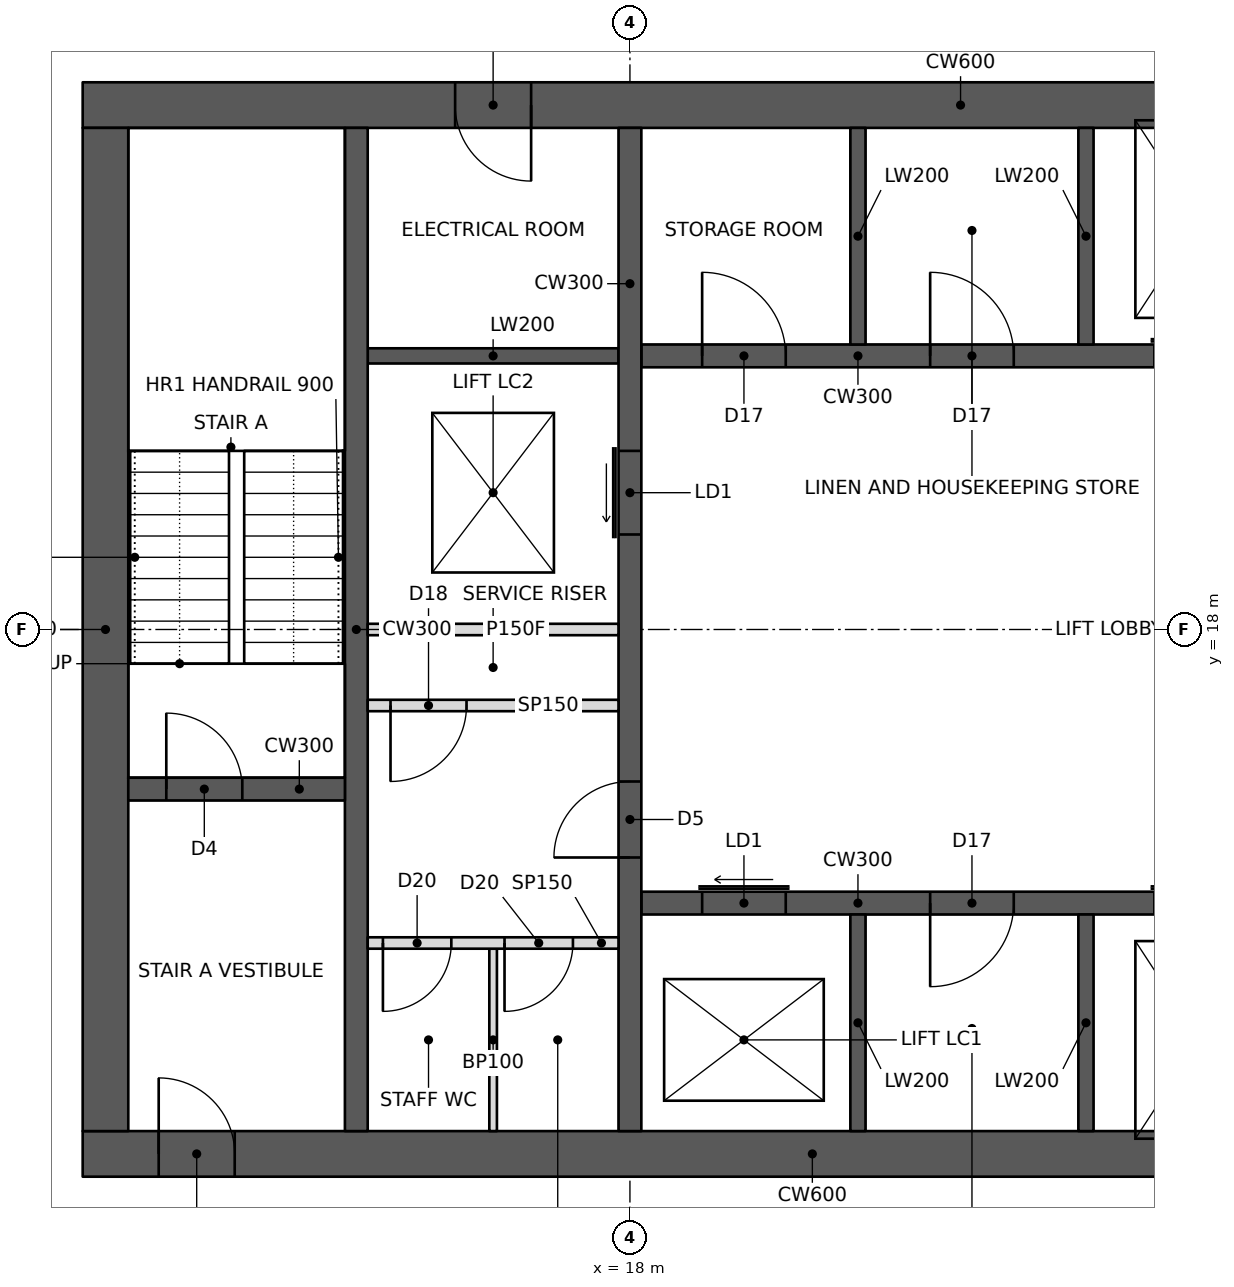
"""IFC4 building model, lengths in metres.
Left out: names, types, materials, properties, quantities, classifications, styles, units other than length and angle.
Written with IfcOpenShell. Run it as: python <this file> out.ifc"""

import sys

from ifc_helpers import new_model, si_unit, direction, frame, frame_2d, origin, place, context, subcontext, project, spatial, rectangle, extrude, element, fill, save


model = new_model("IFC4")
c1 = context("Model", 3, precision=1e-05, world=origin(), true_north=direction((0.0, 1.0)))
c2 = subcontext(c1, "Body", "Model", "MODEL_VIEW")
j1 = project(units=[si_unit("LENGTHUNIT", "METRE"), si_unit("PLANEANGLEUNIT", "RADIAN")], contexts=[c1])
p1 = place(None, origin())
s1 = spatial("IfcSite", under=j1, at=p1, CompositionType="ELEMENT")
p2 = place(p1, origin())
s2 = spatial("IfcBuilding", under=s1, at=p2, CompositionType="ELEMENT")
p3 = place(p2, frame((0.0, 0.0, 248.2)))
s3 = spatial("IfcBuildingStorey", under=s2, at=p3, CompositionType="ELEMENT", Elevation=248.2)
p4 = place(p3, frame((10.8, 11.1, 0.0), z_axis=(0.0, 0.0, 1.0), x_axis=(1.0, 0.0, 0.0)))
e1 = element("IfcWall", 1, at=p4, inside=s3, PredefinedType="SHEAR", context=c2, shape_type="SweptSolid", body=[
    extrude(rectangle(XDim=23.4, YDim=0.6, at=frame_2d((11.7, 0.0))), origin(), (0.0, 0.0, 1.0), 3.6),
])
p5 = place(p4, frame((1.0, 0.0, 0.0)))
e2 = element("IfcOpeningElement", 2, at=p5, cuts=e1, PredefinedType="OPENING", context=c2, shape_type="SweptSolid", body=[
    extrude(rectangle(XDim=1.0, YDim=2.1, at=frame_2d((0.5, 1.05))), frame((0.0, 0.31, 0.0), z_axis=(0.0, -1.0, 0.0), x_axis=(1.0, 0.0, 0.0)), (0.0, 0.0, 1.0), 0.62),
])
p6 = place(p4, frame((17.2, 0.0, 0.0)))
e3 = element("IfcOpeningElement", 3, at=p6, cuts=e1, PredefinedType="OPENING", context=c2, shape_type="SweptSolid", body=[
    extrude(rectangle(XDim=1.8, YDim=2.1, at=frame_2d((0.9, 1.05))), frame((0.0, 0.31, 0.0), z_axis=(0.0, -1.0, 0.0), x_axis=(1.0, 0.0, 0.0)), (0.0, 0.0, 1.0), 0.62),
])
p7 = place(p3, frame((10.8, 24.9, 0.0), z_axis=(0.0, 0.0, 1.0), x_axis=(1.0, 0.0, 0.0)))
e4 = element("IfcWall", 4, at=p7, inside=s3, PredefinedType="SHEAR", context=c2, shape_type="SweptSolid", body=[
    extrude(rectangle(XDim=23.4, YDim=0.6, at=frame_2d((11.7, 0.0))), origin(), (0.0, 0.0, 1.0), 3.6),
])
p8 = place(p7, frame((17.2, 0.0, 0.0)))
e5 = element("IfcOpeningElement", 5, at=p8, cuts=e4, PredefinedType="OPENING", context=c2, shape_type="SweptSolid", body=[
    extrude(rectangle(XDim=1.8, YDim=2.1, at=frame_2d((0.9, 1.05))), frame((0.0, 0.31, 0.0), z_axis=(0.0, -1.0, 0.0), x_axis=(1.0, 0.0, 0.0)), (0.0, 0.0, 1.0), 0.62),
])
p9 = place(p7, frame((21.1, 0.0, 0.0)))
e6 = element("IfcOpeningElement", 6, at=p9, cuts=e4, PredefinedType="OPENING", context=c2, shape_type="SweptSolid", body=[
    extrude(rectangle(XDim=1.0, YDim=2.1, at=frame_2d((0.5, 1.05))), frame((0.0, 0.31, 0.0), z_axis=(0.0, -1.0, 0.0), x_axis=(1.0, 0.0, 0.0)), (0.0, 0.0, 1.0), 0.62),
])
p10 = place(p7, frame((4.9, 0.0, 0.0)))
e7 = element("IfcOpeningElement", 7, at=p10, cuts=e4, PredefinedType="OPENING", context=c2, shape_type="SweptSolid", body=[
    extrude(rectangle(XDim=1.0, YDim=2.1, at=frame_2d((0.5, 1.05))), frame((0.0, 0.31, 0.0), z_axis=(0.0, -1.0, 0.0), x_axis=(1.0, 0.0, 0.0)), (0.0, 0.0, 1.0), 0.62),
])
p11 = place(p3, frame((11.1, 11.4, 0.0), z_axis=(0.0, 0.0, 1.0), x_axis=(0.0, 1.0, 0.0)))
e8 = element("IfcWall", 8, at=p11, inside=s3, PredefinedType="SHEAR", context=c2, shape_type="SweptSolid", body=[
    extrude(rectangle(XDim=13.2, YDim=0.6, at=frame_2d((6.6, 0.0))), origin(), (0.0, 0.0, 1.0), 3.6),
])
p12 = place(p3, frame((14.4, 11.4, 0.0), z_axis=(0.0, 0.0, 1.0), x_axis=(0.0, 1.0, 0.0)))
e9 = element("IfcWall", 9, at=p12, inside=s3, PredefinedType="SHEAR", context=c2, shape_type="SweptSolid", body=[
    extrude(rectangle(XDim=13.2, YDim=0.3, at=frame_2d((6.6, 0.0))), origin(), (0.0, 0.0, 1.0), 3.6),
])
p13 = place(p3, frame((11.4, 15.9, 0.0), z_axis=(0.0, 0.0, 1.0), x_axis=(1.0, 0.0, 0.0)))
e10 = element("IfcWall", 10, at=p13, inside=s3, PredefinedType="SHEAR", context=c2, shape_type="SweptSolid", body=[
    extrude(rectangle(XDim=2.85, YDim=0.3, at=frame_2d((1.425, 0.0))), origin(), (0.0, 0.0, 1.0), 3.6),
])
p14 = place(p13, frame((0.5, 0.0, 0.0)))
e11 = element("IfcOpeningElement", 11, at=p14, cuts=e10, PredefinedType="OPENING", context=c2, shape_type="SweptSolid", body=[
    extrude(rectangle(XDim=1.0, YDim=2.1, at=frame_2d((0.5, 1.05))), frame((0.0, 0.16, 0.0), z_axis=(0.0, -1.0, 0.0), x_axis=(1.0, 0.0, 0.0)), (0.0, 0.0, 1.0), 0.32),
])
p15 = place(p3, frame((18.0, 11.4, 0.0), z_axis=(0.0, 0.0, 1.0), x_axis=(0.0, 1.0, 0.0)))
e12 = element("IfcWall", 12, at=p15, inside=s3, PredefinedType="SHEAR", context=c2, shape_type="SweptSolid", body=[
    extrude(rectangle(XDim=13.2, YDim=0.3, at=frame_2d((6.6, 0.0))), origin(), (0.0, 0.0, 1.0), 3.6),
])
p16 = place(p15, frame((3.6, 0.0, 0.0)))
e13 = element("IfcOpeningElement", 13, at=p16, cuts=e12, PredefinedType="OPENING", context=c2, shape_type="SweptSolid", body=[
    extrude(rectangle(XDim=1.0, YDim=2.1, at=frame_2d((0.5, 1.05))), frame((0.0, 0.16, 0.0), z_axis=(0.0, -1.0, 0.0), x_axis=(1.0, 0.0, 0.0)), (0.0, 0.0, 1.0), 0.32),
])
p17 = place(p15, frame((7.85, 0.0, 0.0)))
e14 = element("IfcOpeningElement", 14, at=p17, cuts=e12, PredefinedType="OPENING", context=c2, shape_type="SweptSolid", body=[
    extrude(rectangle(XDim=1.1, YDim=2.1, at=frame_2d((0.55, 1.05))), frame((0.0, 0.16, 0.0), z_axis=(0.0, -1.0, 0.0), x_axis=(1.0, 0.0, 0.0)), (0.0, 0.0, 1.0), 0.32),
])
p18 = place(p3, frame((14.55, 18.0, 0.0), z_axis=(0.0, 0.0, 1.0), x_axis=(1.0, 0.0, 0.0)))
e15 = element("IfcWall", 15, at=p18, inside=s3, PredefinedType="PARTITIONING", context=c2, shape_type="SweptSolid", body=[
    extrude(rectangle(XDim=3.3, YDim=0.15, at=frame_2d((1.65, 0.0))), origin(), (0.0, 0.0, 1.0), 3.4),
])
p19 = place(p3, frame((18.15, 14.4, 0.0), z_axis=(0.0, 0.0, 1.0), x_axis=(1.0, 0.0, 0.0)))
e16 = element("IfcWall", 16, at=p19, inside=s3, PredefinedType="SHEAR", context=c2, shape_type="SweptSolid", body=[
    extrude(rectangle(XDim=9.0, YDim=0.3, at=frame_2d((4.5, 0.0))), origin(), (0.0, 0.0, 1.0), 3.6),
])
p20 = place(p19, frame((0.8, 0.0, 0.0)))
e17 = element("IfcOpeningElement", 17, at=p20, cuts=e16, PredefinedType="OPENING", context=c2, shape_type="SweptSolid", body=[
    extrude(rectangle(XDim=1.1, YDim=2.1, at=frame_2d((0.55, 1.05))), frame((0.0, 0.16, 0.0), z_axis=(0.0, -1.0, 0.0), x_axis=(1.0, 0.0, 0.0)), (0.0, 0.0, 1.0), 0.32),
])
p21 = place(p19, frame((6.75, 0.0, 0.0)))
e18 = element("IfcOpeningElement", 18, at=p21, cuts=e16, PredefinedType="OPENING", context=c2, shape_type="SweptSolid", body=[
    extrude(rectangle(XDim=1.2, YDim=2.1, at=frame_2d((0.6, 1.05))), frame((0.0, 0.16, 0.0), z_axis=(0.0, -1.0, 0.0), x_axis=(1.0, 0.0, 0.0)), (0.0, 0.0, 1.0), 0.32),
])
p22 = place(p19, frame((3.8, 0.0, 0.0)))
e19 = element("IfcOpeningElement", 19, at=p22, cuts=e16, PredefinedType="OPENING", context=c2, shape_type="SweptSolid", body=[
    extrude(rectangle(XDim=1.1, YDim=2.1, at=frame_2d((0.55, 1.05))), frame((0.0, 0.16, 0.0), z_axis=(0.0, -1.0, 0.0), x_axis=(1.0, 0.0, 0.0)), (0.0, 0.0, 1.0), 0.32),
])
for number, where, z_axis, x_axis in (
    (20, (21.0, 11.4, 0.0), (0.0, 0.0, 1.0), (0.0, 1.0, 0.0)),
    (21, (24.0, 11.4, 0.0), (0.0, 0.0, 1.0), (0.0, 1.0, 0.0)),
):
    element("IfcWall", number, at=place(p3, frame(where, z_axis=z_axis, x_axis=x_axis)), inside=s3, PredefinedType="SHEAR", context=c2, shape_type="SweptSolid", body=[
        extrude(rectangle(XDim=2.85, YDim=0.2, at=frame_2d((1.425, 0.0))), origin(), (0.0, 0.0, 1.0), 3.6),
    ])
p23 = place(p3, frame((18.15, 21.6, 0.0), z_axis=(0.0, 0.0, 1.0), x_axis=(1.0, 0.0, 0.0)))
e22 = element("IfcWall", 22, at=p23, inside=s3, PredefinedType="SHEAR", context=c2, shape_type="SweptSolid", body=[
    extrude(rectangle(XDim=9.0, YDim=0.3, at=frame_2d((4.5, 0.0))), origin(), (0.0, 0.0, 1.0), 3.6),
])
p24 = place(p23, frame((6.75, 0.0, 0.0)))
e23 = element("IfcOpeningElement", 23, at=p24, cuts=e22, PredefinedType="OPENING", context=c2, shape_type="SweptSolid", body=[
    extrude(rectangle(XDim=1.2, YDim=2.1, at=frame_2d((0.6, 1.05))), frame((0.0, 0.16, 0.0), z_axis=(0.0, -1.0, 0.0), x_axis=(1.0, 0.0, 0.0)), (0.0, 0.0, 1.0), 0.32),
])
p25 = place(p23, frame((0.8, 0.0, 0.0)))
e24 = element("IfcOpeningElement", 24, at=p25, cuts=e22, PredefinedType="OPENING", context=c2, shape_type="SweptSolid", body=[
    extrude(rectangle(XDim=1.1, YDim=2.1, at=frame_2d((0.55, 1.05))), frame((0.0, 0.16, 0.0), z_axis=(0.0, -1.0, 0.0), x_axis=(1.0, 0.0, 0.0)), (0.0, 0.0, 1.0), 0.32),
])
p26 = place(p23, frame((3.8, 0.0, 0.0)))
e25 = element("IfcOpeningElement", 25, at=p26, cuts=e22, PredefinedType="OPENING", context=c2, shape_type="SweptSolid", body=[
    extrude(rectangle(XDim=1.1, YDim=2.1, at=frame_2d((0.55, 1.05))), frame((0.0, 0.16, 0.0), z_axis=(0.0, -1.0, 0.0), x_axis=(1.0, 0.0, 0.0)), (0.0, 0.0, 1.0), 0.32),
])
for number, where, z_axis, x_axis in (
    (26, (21.0, 21.75, 0.0), (0.0, 0.0, 1.0), (0.0, 1.0, 0.0)),
    (27, (24.0, 21.75, 0.0), (0.0, 0.0, 1.0), (0.0, 1.0, 0.0)),
):
    element("IfcWall", number, at=place(p3, frame(where, z_axis=z_axis, x_axis=x_axis)), inside=s3, PredefinedType="SHEAR", context=c2, shape_type="SweptSolid", body=[
        extrude(rectangle(XDim=2.85, YDim=0.2, at=frame_2d((1.425, 0.0))), origin(), (0.0, 0.0, 1.0), 3.6),
    ])
p27 = place(p3, frame((14.55, 21.6, 0.0), z_axis=(0.0, 0.0, 1.0), x_axis=(1.0, 0.0, 0.0)))
e28 = element("IfcWall", 28, at=p27, inside=s3, PredefinedType="SHEAR", context=c2, shape_type="SweptSolid", body=[
    extrude(rectangle(XDim=3.3, YDim=0.2, at=frame_2d((1.65, 0.0))), origin(), (0.0, 0.0, 1.0), 3.6),
])
p28 = place(p3, frame((14.55, 17.0, 0.0), z_axis=(0.0, 0.0, 1.0), x_axis=(1.0, 0.0, 0.0)))
e29 = element("IfcWall", 29, at=p28, inside=s3, PredefinedType="PARTITIONING", context=c2, shape_type="SweptSolid", body=[
    extrude(rectangle(XDim=3.3, YDim=0.15, at=frame_2d((1.65, 0.0))), origin(), (0.0, 0.0, 1.0), 3.4),
])
p29 = place(p28, frame((0.3, 0.0, 0.0)))
e30 = element("IfcOpeningElement", 30, at=p29, cuts=e29, PredefinedType="OPENING", context=c2, shape_type="SweptSolid", body=[
    extrude(rectangle(XDim=1.0, YDim=2.1, at=frame_2d((0.5, 1.05))), frame((0.0, 0.085, 0.0), z_axis=(0.0, -1.0, 0.0), x_axis=(1.0, 0.0, 0.0)), (0.0, 0.0, 1.0), 0.17),
])
p30 = place(p3, frame((14.55, 13.875, 0.0), z_axis=(0.0, 0.0, 1.0), x_axis=(1.0, 0.0, 0.0)))
e31 = element("IfcWall", 31, at=p30, inside=s3, PredefinedType="PARTITIONING", context=c2, shape_type="SweptSolid", body=[
    extrude(rectangle(XDim=3.3, YDim=0.15, at=frame_2d((1.65, 0.0))), origin(), (0.0, 0.0, 1.0), 3.4),
])
p31 = place(p30, frame((0.2, 0.0, 0.0)))
e32 = element("IfcOpeningElement", 32, at=p31, cuts=e31, PredefinedType="OPENING", context=c2, shape_type="SweptSolid", body=[
    extrude(rectangle(XDim=0.9, YDim=2.1, at=frame_2d((0.45, 1.05))), frame((0.0, 0.085, 0.0), z_axis=(0.0, -1.0, 0.0), x_axis=(1.0, 0.0, 0.0)), (0.0, 0.0, 1.0), 0.17),
])
p32 = place(p30, frame((1.8, 0.0, 0.0)))
e33 = element("IfcOpeningElement", 33, at=p32, cuts=e31, PredefinedType="OPENING", context=c2, shape_type="SweptSolid", body=[
    extrude(rectangle(XDim=0.9, YDim=2.1, at=frame_2d((0.45, 1.05))), frame((0.0, 0.085, 0.0), z_axis=(0.0, -1.0, 0.0), x_axis=(1.0, 0.0, 0.0)), (0.0, 0.0, 1.0), 0.17),
])
p33 = place(p3, frame((16.2, 11.4, 0.0), z_axis=(0.0, 0.0, 1.0), x_axis=(0.0, 1.0, 0.0)))
e34 = element("IfcWall", 34, at=p33, inside=s3, PredefinedType="PARTITIONING", context=c2, shape_type="SweptSolid", body=[
    extrude(rectangle(XDim=2.4, YDim=0.1, at=frame_2d((1.2, 0.0))), origin(), (0.0, 0.0, 1.0), 3.4),
])
p34 = place(p29, frame((1.0, 0.0, 0.0), z_axis=(0.0, 0.0, 1.0), x_axis=(-1.0, 0.0, 0.0)))
e35 = element("IfcDoor", 35, at=p34, inside=s3, OperationType="SINGLE_SWING_RIGHT", PredefinedType="DOOR", context=c2, shape_type="SweptSolid", body=[
    extrude(rectangle(XDim=1.0, YDim=2.1, at=frame_2d((0.5, 1.05))), frame((0.0, 0.025, 0.0), z_axis=(0.0, -1.0, 0.0), x_axis=(1.0, 0.0, 0.0)), (0.0, 0.0, 1.0), 0.05),
])
fill(e30, e35)
p35 = place(p31, frame((0.9, 0.0, 0.0), z_axis=(0.0, 0.0, 1.0), x_axis=(-1.0, 0.0, 0.0)))
e36 = element("IfcDoor", 36, at=p35, inside=s3, OperationType="SINGLE_SWING_RIGHT", PredefinedType="DOOR", context=c2, shape_type="SweptSolid", body=[
    extrude(rectangle(XDim=0.9, YDim=2.1, at=frame_2d((0.45, 1.05))), frame((0.0, 0.025, 0.0), z_axis=(0.0, -1.0, 0.0), x_axis=(1.0, 0.0, 0.0)), (0.0, 0.0, 1.0), 0.05),
])
fill(e32, e36)
p36 = place(p32, frame((0.9, 0.0, 0.0), z_axis=(0.0, 0.0, 1.0), x_axis=(-1.0, 0.0, 0.0)))
e37 = element("IfcDoor", 37, at=p36, inside=s3, OperationType="SINGLE_SWING_RIGHT", PredefinedType="DOOR", context=c2, shape_type="SweptSolid", body=[
    extrude(rectangle(XDim=0.9, YDim=2.1, at=frame_2d((0.45, 1.05))), frame((0.0, 0.025, 0.0), z_axis=(0.0, -1.0, 0.0), x_axis=(1.0, 0.0, 0.0)), (0.0, 0.0, 1.0), 0.05),
])
fill(e33, e37)
p37 = place(p5, origin())
e38 = element("IfcDoor", 38, at=p37, inside=s3, OperationType="SINGLE_SWING_LEFT", PredefinedType="DOOR", context=c2, shape_type="SweptSolid", body=[
    extrude(rectangle(XDim=1.0, YDim=2.1, at=frame_2d((0.5, 1.05))), frame((0.0, 0.025, 0.0), z_axis=(0.0, -1.0, 0.0), x_axis=(1.0, 0.0, 0.0)), (0.0, 0.0, 1.0), 0.05),
])
fill(e2, e38)
p38 = place(p14, origin())
e39 = element("IfcDoor", 39, at=p38, inside=s3, OperationType="SINGLE_SWING_LEFT", PredefinedType="DOOR", context=c2, shape_type="SweptSolid", body=[
    extrude(rectangle(XDim=1.0, YDim=2.1, at=frame_2d((0.5, 1.05))), frame((0.0, 0.025, 0.0), z_axis=(0.0, -1.0, 0.0), x_axis=(1.0, 0.0, 0.0)), (0.0, 0.0, 1.0), 0.05),
])
fill(e11, e39)
p39 = place(p16, origin())
e40 = element("IfcDoor", 40, at=p39, inside=s3, OperationType="SINGLE_SWING_LEFT", PredefinedType="DOOR", context=c2, shape_type="SweptSolid", body=[
    extrude(rectangle(XDim=1.0, YDim=2.1, at=frame_2d((0.5, 1.05))), frame((0.0, 0.025, 0.0), z_axis=(0.0, -1.0, 0.0), x_axis=(1.0, 0.0, 0.0)), (0.0, 0.0, 1.0), 0.05),
])
fill(e13, e40)
p40 = place(p10, frame((1.0, 0.0, 0.0), z_axis=(0.0, 0.0, 1.0), x_axis=(-1.0, 0.0, 0.0)))
e41 = element("IfcDoor", 41, at=p40, inside=s3, OperationType="SINGLE_SWING_LEFT", PredefinedType="DOOR", context=c2, shape_type="SweptSolid", body=[
    extrude(rectangle(XDim=1.0, YDim=2.1, at=frame_2d((0.5, 1.05))), frame((0.0, 0.025, 0.0), z_axis=(0.0, -1.0, 0.0), x_axis=(1.0, 0.0, 0.0)), (0.0, 0.0, 1.0), 0.05),
])
fill(e7, e41)
p41 = place(p20, origin())
e42 = element("IfcDoor", 42, at=p41, inside=s3, OperationType="SLIDING_TO_LEFT", PredefinedType="DOOR", context=c2, shape_type="SweptSolid", body=[
    extrude(rectangle(XDim=1.1, YDim=2.1, at=frame_2d((0.55, 1.05))), frame((0.0, 0.025, 0.0), z_axis=(0.0, -1.0, 0.0), x_axis=(1.0, 0.0, 0.0)), (0.0, 0.0, 1.0), 0.05),
])
fill(e17, e42)
p42 = place(p17, origin())
e43 = element("IfcDoor", 43, at=p42, inside=s3, OperationType="SLIDING_TO_LEFT", PredefinedType="DOOR", context=c2, shape_type="SweptSolid", body=[
    extrude(rectangle(XDim=1.1, YDim=2.1, at=frame_2d((0.55, 1.05))), frame((0.0, 0.025, 0.0), z_axis=(0.0, -1.0, 0.0), x_axis=(1.0, 0.0, 0.0)), (0.0, 0.0, 1.0), 0.05),
])
fill(e14, e43)
p43 = place(p25, origin())
e44 = element("IfcDoor", 44, at=p43, inside=s3, OperationType="SINGLE_SWING_LEFT", PredefinedType="DOOR", context=c2, shape_type="SweptSolid", body=[
    extrude(rectangle(XDim=1.1, YDim=2.1, at=frame_2d((0.55, 1.05))), frame((0.0, 0.025, 0.0), z_axis=(0.0, -1.0, 0.0), x_axis=(1.0, 0.0, 0.0)), (0.0, 0.0, 1.0), 0.05),
])
fill(e24, e44)
p44 = place(p26, origin())
e45 = element("IfcDoor", 45, at=p44, inside=s3, OperationType="SINGLE_SWING_LEFT", PredefinedType="DOOR", context=c2, shape_type="SweptSolid", body=[
    extrude(rectangle(XDim=1.1, YDim=2.1, at=frame_2d((0.55, 1.05))), frame((0.0, 0.025, 0.0), z_axis=(0.0, -1.0, 0.0), x_axis=(1.0, 0.0, 0.0)), (0.0, 0.0, 1.0), 0.05),
])
fill(e25, e45)
p45 = place(p22, frame((1.1, 0.0, 0.0), z_axis=(0.0, 0.0, 1.0), x_axis=(-1.0, 0.0, 0.0)))
e46 = element("IfcDoor", 46, at=p45, inside=s3, OperationType="SINGLE_SWING_RIGHT", PredefinedType="DOOR", context=c2, shape_type="SweptSolid", body=[
    extrude(rectangle(XDim=1.1, YDim=2.1, at=frame_2d((0.55, 1.05))), frame((0.0, 0.025, 0.0), z_axis=(0.0, -1.0, 0.0), x_axis=(1.0, 0.0, 0.0)), (0.0, 0.0, 1.0), 0.05),
])
fill(e19, e46)
save(model, sys.argv[1])
